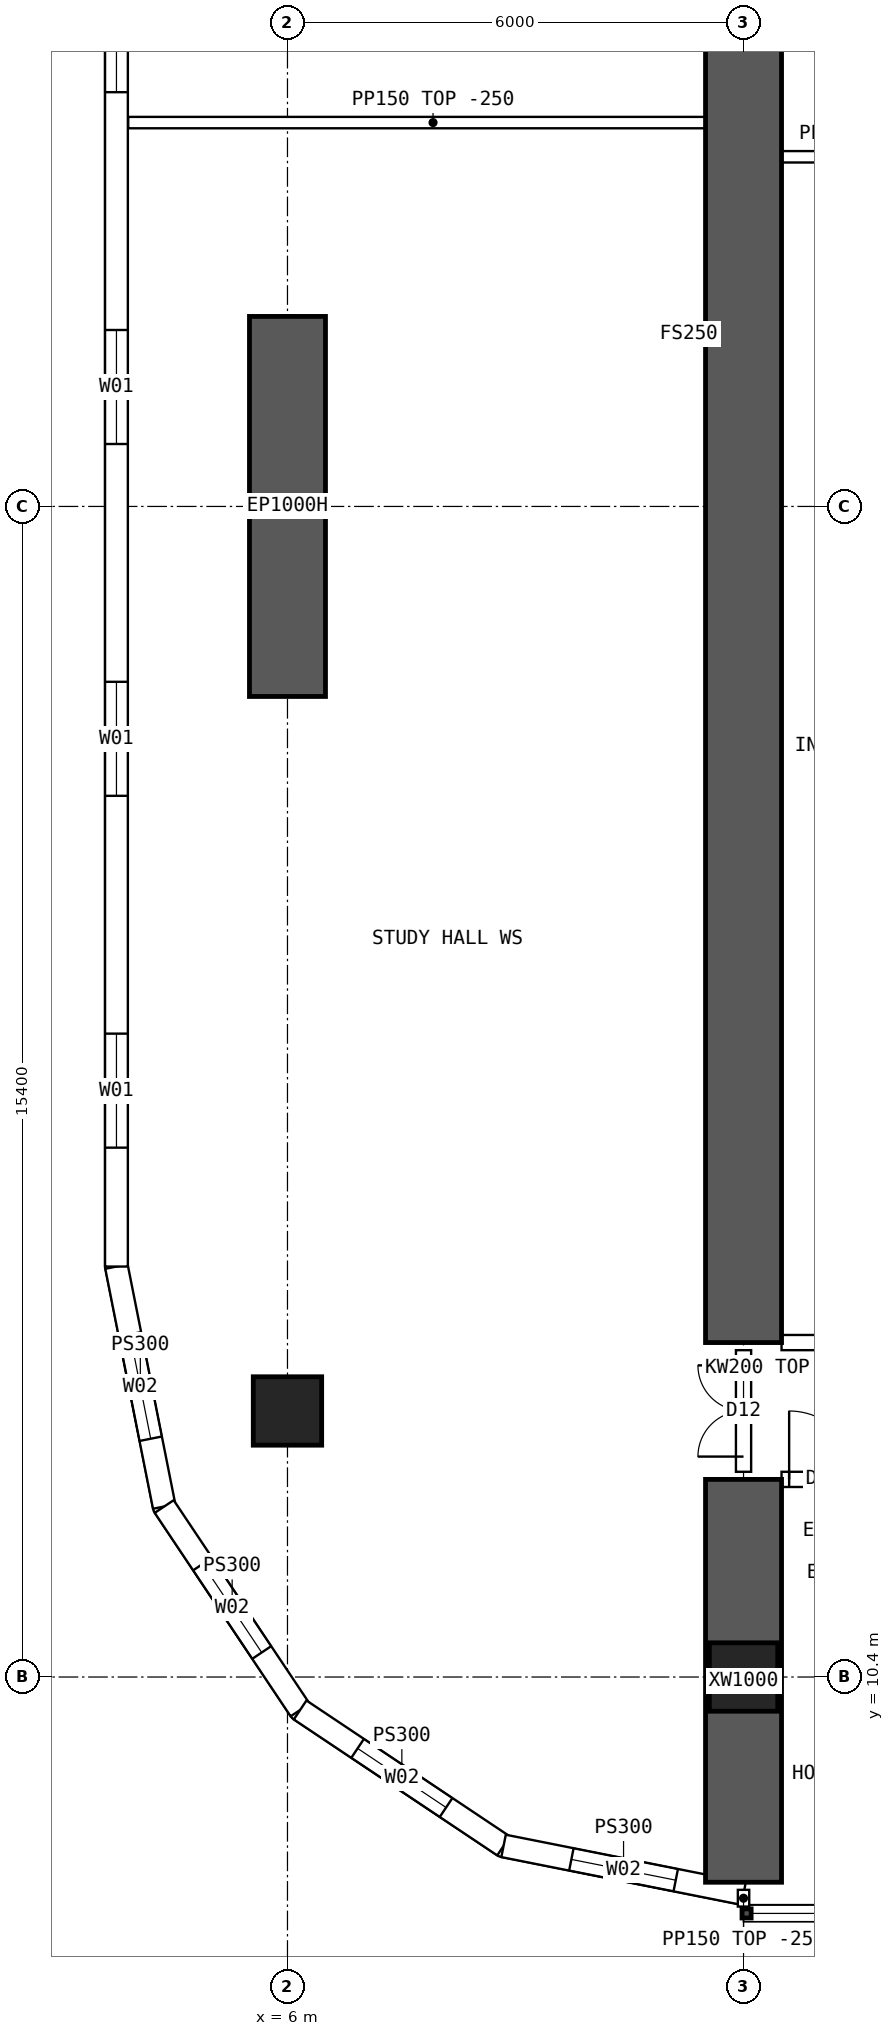
"""IFC4 building model, lengths in metres.
Left out: names, types, materials, properties, quantities, classifications, styles, units other than length and angle.
Written with IfcOpenShell. Run it as: python <this file> out.ifc"""

import sys

from ifc_helpers import new_model, si_unit, direction, frame, frame_2d, origin, origin_2d, place, context, subcontext, project, spatial, polyline, rectangle, hollow_rectangle, outline, extrude, element, fill, save


model = new_model("IFC4")
c1 = context("Model", 3, precision=1e-05, world=origin(), true_north=direction((0.0, 1.0)))
c2 = subcontext(c1, "Body", "Model", "MODEL_VIEW")
j1 = project(units=[si_unit("LENGTHUNIT", "METRE"), si_unit("PLANEANGLEUNIT", "RADIAN")], contexts=[c1])
p1 = place(None, origin())
s1 = spatial("IfcSite", under=j1, at=p1, CompositionType="ELEMENT")
p2 = place(p1, origin())
s2 = spatial("IfcBuilding", under=s1, at=p2, CompositionType="ELEMENT")
p3 = place(p2, frame((0.0, 0.0, 31.45)))
s3 = spatial("IfcBuildingStorey", under=s2, at=p3, CompositionType="ELEMENT", Elevation=31.45)
for number, where, z_axis, x_axis in (
    (1, (12.0, 10.4, 0.0), (0.0, 0.0, 1.0), (1.0, 0.0, 0.0)),
    (2, (6.0, 13.9, 0.0), (0.0, 0.0, 1.0), (1.0, 0.0, 0.0)),
):
    element("IfcColumn", number, at=place(p3, frame(where, z_axis=z_axis, x_axis=x_axis)), inside=s3, PredefinedType="COLUMN", context=c2, shape_type="SweptSolid", body=[
        extrude(hollow_rectangle(XDim=0.9, YDim=0.9, WallThickness=0.09, at=origin_2d()), origin(), (0.0, 0.0, 1.0), 3.75),
    ])
p4 = place(p3, frame((6.0, 23.3, 0.0), z_axis=(0.0, 0.0, 1.0), x_axis=(0.0, 1.0, 0.0)))
e3 = element("IfcWall", 3, at=p4, inside=s3, PredefinedType="SHEAR", context=c2, shape_type="SweptSolid", body=[
    extrude(rectangle(XDim=5.0, YDim=1.0, at=frame_2d((2.5, 0.0))), origin(), (0.0, 0.0, 1.0), 3.75),
])
p5 = place(p3, frame((12.0, 7.7, 0.0), z_axis=(0.0, 0.0, 1.0), x_axis=(0.0, 1.0, 0.0)))
e4 = element("IfcWall", 4, at=p5, inside=s3, PredefinedType="SHEAR", context=c2, shape_type="SweptSolid", body=[
    extrude(rectangle(XDim=5.3, YDim=1.0, at=frame_2d((2.65, 0.0))), origin(), (0.0, 0.0, 1.0), 3.75),
])
p6 = place(p3, frame((12.0, 14.8, 0.0), z_axis=(0.0, 0.0, 1.0), x_axis=(0.0, 1.0, 0.0)))
e5 = element("IfcWall", 5, at=p6, inside=s3, PredefinedType="SHEAR", context=c2, shape_type="SweptSolid", body=[
    extrude(rectangle(XDim=34.4, YDim=1.0, at=frame_2d((17.2, 0.0))), origin(), (0.0, 0.0, 1.0), 3.75),
])
p7 = place(p3, frame((3.75, 48.2, 0.0), z_axis=(0.0, 0.0, 1.0), x_axis=(0.0, -1.0, 0.0)))
e6 = element("IfcWall", 6, at=p7, inside=s3, PredefinedType="SOLIDWALL", context=c2, shape_type="SweptSolid", body=[
    extrude(outline(polyline([(-0.015, -0.15), (32.415, -0.15), (32.385, 0.15), (0.015, 0.15), (-0.015, -0.15)])), origin(), (0.0, 0.0, 1.0), 3.5),
])
p8 = place(p7, frame((1.564, 0.0, 0.9)))
e7 = element("IfcOpeningElement", 7, at=p8, cuts=e6, PredefinedType="OPENING", context=c2, shape_type="SweptSolid", body=[
    extrude(rectangle(XDim=1.5, YDim=2.0, at=frame_2d((0.75, 1.0))), frame((0.0, 0.16, 0.0), z_axis=(0.0, -1.0, 0.0), x_axis=(1.0, 0.0, 0.0)), (0.0, 0.0, 1.0), 0.32),
])
p9 = place(p7, frame((6.193, 0.0, 0.9)))
e8 = element("IfcOpeningElement", 8, at=p9, cuts=e6, PredefinedType="OPENING", context=c2, shape_type="SweptSolid", body=[
    extrude(rectangle(XDim=1.5, YDim=2.0, at=frame_2d((0.75, 1.0))), frame((0.0, 0.16, 0.0), z_axis=(0.0, -1.0, 0.0), x_axis=(1.0, 0.0, 0.0)), (0.0, 0.0, 1.0), 0.32),
])
p10 = place(p7, frame((10.822, 0.0, 0.9)))
e9 = element("IfcOpeningElement", 9, at=p10, cuts=e6, PredefinedType="OPENING", context=c2, shape_type="SweptSolid", body=[
    extrude(rectangle(XDim=1.5, YDim=2.0, at=frame_2d((0.75, 1.0))), frame((0.0, 0.16, 0.0), z_axis=(0.0, -1.0, 0.0), x_axis=(1.0, 0.0, 0.0)), (0.0, 0.0, 1.0), 0.32),
])
p11 = place(p7, frame((15.45, 0.0, 0.9)))
e10 = element("IfcOpeningElement", 10, at=p11, cuts=e6, PredefinedType="OPENING", context=c2, shape_type="SweptSolid", body=[
    extrude(rectangle(XDim=1.5, YDim=2.0, at=frame_2d((0.75, 1.0))), frame((0.0, 0.16, 0.0), z_axis=(0.0, -1.0, 0.0), x_axis=(1.0, 0.0, 0.0)), (0.0, 0.0, 1.0), 0.32),
])
p12 = place(p7, frame((20.079, 0.0, 0.9)))
e11 = element("IfcOpeningElement", 11, at=p12, cuts=e6, PredefinedType="OPENING", context=c2, shape_type="SweptSolid", body=[
    extrude(rectangle(XDim=1.5, YDim=2.0, at=frame_2d((0.75, 1.0))), frame((0.0, 0.16, 0.0), z_axis=(0.0, -1.0, 0.0), x_axis=(1.0, 0.0, 0.0)), (0.0, 0.0, 1.0), 0.32),
])
p13 = place(p7, frame((24.707, 0.0, 0.9)))
e12 = element("IfcOpeningElement", 12, at=p13, cuts=e6, PredefinedType="OPENING", context=c2, shape_type="SweptSolid", body=[
    extrude(rectangle(XDim=1.5, YDim=2.0, at=frame_2d((0.75, 1.0))), frame((0.0, 0.16, 0.0), z_axis=(0.0, -1.0, 0.0), x_axis=(1.0, 0.0, 0.0)), (0.0, 0.0, 1.0), 0.32),
])
p14 = place(p7, frame((29.336, 0.0, 0.9)))
e13 = element("IfcOpeningElement", 13, at=p14, cuts=e6, PredefinedType="OPENING", context=c2, shape_type="SweptSolid", body=[
    extrude(rectangle(XDim=1.5, YDim=2.0, at=frame_2d((0.75, 1.0))), frame((0.0, 0.16, 0.0), z_axis=(0.0, -1.0, 0.0), x_axis=(1.0, 0.0, 0.0)), (0.0, 0.0, 1.0), 0.32),
])
p15 = place(p3, frame((3.75, 15.8, 0.0), z_axis=(0.0, 0.0, 1.0), x_axis=(0.195065901187, -0.980790137692, 0.0)))
e14 = element("IfcWall", 14, at=p15, inside=s3, PredefinedType="SOLIDWALL", context=c2, shape_type="SweptSolid", body=[
    extrude(outline(polyline([(-0.015, -0.15), (3.249, -0.15), (3.189, 0.15), (0.015, 0.15), (-0.015, -0.15)])), origin(), (0.0, 0.0, 1.0), 3.5),
])
p16 = place(p15, frame((0.909, 0.0, 0.9)))
e15 = element("IfcOpeningElement", 15, at=p16, cuts=e14, PredefinedType="OPENING", context=c2, shape_type="SweptSolid", body=[
    extrude(rectangle(XDim=1.4, YDim=1.8, at=frame_2d((0.7, 0.9))), frame((0.0, 0.16, 0.0), z_axis=(0.0, -1.0, 0.0), x_axis=(1.0, 0.0, 0.0)), (0.0, 0.0, 1.0), 0.32),
])
p17 = place(p3, frame((4.378, 12.643, 0.0), z_axis=(0.0, 0.0, 1.0), x_axis=(0.555609954424, -0.831443069936, 0.0)))
e16 = element("IfcWall", 16, at=p17, inside=s3, PredefinedType="SOLIDWALL", context=c2, shape_type="SweptSolid", body=[
    extrude(outline(polyline([(-0.03, -0.15), (3.249, -0.15), (3.189, 0.15), (0.03, 0.15), (-0.03, -0.15)])), origin(), (0.0, 0.0, 1.0), 3.5),
])
p18 = place(p17, frame((0.909, 0.0, 0.9)))
e17 = element("IfcOpeningElement", 17, at=p18, cuts=e16, PredefinedType="OPENING", context=c2, shape_type="SweptSolid", body=[
    extrude(rectangle(XDim=1.4, YDim=1.8, at=frame_2d((0.7, 0.9))), frame((0.0, 0.16, 0.0), z_axis=(0.0, -1.0, 0.0), x_axis=(1.0, 0.0, 0.0)), (0.0, 0.0, 1.0), 0.32),
])
p19 = place(p3, frame((6.167, 9.966, 0.0), z_axis=(0.0, 0.0, 1.0), x_axis=(0.831478105043, -0.555557522525, 0.0)))
e18 = element("IfcWall", 18, at=p19, inside=s3, PredefinedType="SOLIDWALL", context=c2, shape_type="SweptSolid", body=[
    extrude(outline(polyline([(-0.03, -0.15), (3.249, -0.15), (3.189, 0.15), (0.03, 0.15), (-0.03, -0.15)])), origin(), (0.0, 0.0, 1.0), 3.5),
])
p20 = place(p19, frame((0.909, 0.0, 0.9)))
e19 = element("IfcOpeningElement", 19, at=p20, cuts=e18, PredefinedType="OPENING", context=c2, shape_type="SweptSolid", body=[
    extrude(rectangle(XDim=1.4, YDim=1.8, at=frame_2d((0.7, 0.9))), frame((0.0, 0.16, 0.0), z_axis=(0.0, -1.0, 0.0), x_axis=(1.0, 0.0, 0.0)), (0.0, 0.0, 1.0), 0.32),
])
p21 = place(p3, frame((8.843, 8.178, 0.0), z_axis=(0.0, 0.0, 1.0), x_axis=(0.980787251524, -0.195080412259, 0.0)))
e20 = element("IfcWall", 20, at=p21, inside=s3, PredefinedType="SOLIDWALL", context=c2, shape_type="SweptSolid", body=[
    extrude(outline(polyline([(-0.03, -0.15), (3.249, -0.15), (3.189, 0.15), (0.03, 0.15), (-0.03, -0.15)])), origin(), (0.0, 0.0, 1.0), 3.5),
])
p22 = place(p21, frame((0.909, 0.0, 0.9)))
e21 = element("IfcOpeningElement", 21, at=p22, cuts=e20, PredefinedType="OPENING", context=c2, shape_type="SweptSolid", body=[
    extrude(rectangle(XDim=1.4, YDim=1.8, at=frame_2d((0.7, 0.9))), frame((0.0, 0.16, 0.0), z_axis=(0.0, -1.0, 0.0), x_axis=(1.0, 0.0, 0.0)), (0.0, 0.0, 1.0), 0.32),
])
p23 = place(p3, frame((12.5, 13.0, 0.0), z_axis=(0.0, 0.0, 1.0), x_axis=(1.0, 0.0, 0.0)))
e22 = element("IfcWall", 22, at=p23, inside=s3, PredefinedType="SOLIDWALL", context=c2, shape_type="SweptSolid", body=[
    extrude(outline(polyline([(0.0, 0.0), (5.0, 0.0), (5.0, 3.1), (0.0, 3.1), (0.0, 0.0)])), frame((0.0, 0.1, 0.0), z_axis=(0.0, -1.0, 0.0), x_axis=(1.0, 0.0, 0.0)), (0.0, 0.0, 1.0), 0.2),
])
p24 = place(p23, frame((0.1, 0.0, 0.0)))
e23 = element("IfcOpeningElement", 23, at=p24, cuts=e22, PredefinedType="OPENING", context=c2, shape_type="SweptSolid", body=[
    extrude(rectangle(XDim=0.9, YDim=2.1, at=frame_2d((0.45, 1.05))), frame((0.0, 0.11, 0.0), z_axis=(0.0, -1.0, 0.0), x_axis=(1.0, 0.0, 0.0)), (0.0, 0.0, 1.0), 0.22),
])
p25 = place(p23, frame((4.0, 0.0, 0.0)))
e24 = element("IfcOpeningElement", 24, at=p25, cuts=e22, PredefinedType="OPENING", context=c2, shape_type="SweptSolid", body=[
    extrude(rectangle(XDim=0.9, YDim=2.1, at=frame_2d((0.45, 1.05))), frame((0.0, 0.11, 0.0), z_axis=(0.0, -1.0, 0.0), x_axis=(1.0, 0.0, 0.0)), (0.0, 0.0, 1.0), 0.22),
])
p26 = place(p3, frame((12.5, 14.8, 0.0), z_axis=(0.0, 0.0, 1.0), x_axis=(1.0, 0.0, 0.0)))
e25 = element("IfcWall", 25, at=p26, inside=s3, PredefinedType="SOLIDWALL", context=c2, shape_type="SweptSolid", body=[
    extrude(rectangle(XDim=5.0, YDim=0.2, at=frame_2d((2.5, 0.0))), origin(), (0.0, 0.0, 1.0), 3.5),
])
p27 = place(p26, frame((3.3, 0.0, 0.0)))
e26 = element("IfcOpeningElement", 26, at=p27, cuts=e25, PredefinedType="OPENING", context=c2, shape_type="SweptSolid", body=[
    extrude(rectangle(XDim=1.6, YDim=2.1, at=frame_2d((0.8, 1.05))), frame((0.0, 0.11, 0.0), z_axis=(0.0, -1.0, 0.0), x_axis=(1.0, 0.0, 0.0)), (0.0, 0.0, 1.0), 0.22),
])
p28 = place(p3, frame((12.0, 30.4, 0.0), z_axis=(0.0, 0.0, 1.0), x_axis=(1.0, 0.0, 0.0)))
e27 = element("IfcWall", 27, at=p28, inside=s3, PredefinedType="PARTITIONING", context=c2, shape_type="SweptSolid", body=[
    extrude(rectangle(XDim=3.6, YDim=0.15, at=frame_2d((1.8, 0.0))), origin(), (0.0, 0.0, 1.0), 3.5),
])
p29 = place(p3, frame((3.905, 30.85, 0.0), z_axis=(0.0, 0.0, 1.0), x_axis=(1.0, 0.0, 0.0)))
e28 = element("IfcWall", 28, at=p29, inside=s3, PredefinedType="PARTITIONING", context=c2, shape_type="SweptSolid", body=[
    extrude(outline(polyline([(0.0, 0.0), (8.02, 0.0), (8.02, 3.5), (2.397, 3.5), (2.395, 3.05), (1.797, 3.05), (1.795, 3.5), (0.0, 3.5), (0.0, 0.0)])), frame((0.0, 0.075, 0.0), z_axis=(0.0, -1.0, 0.0), x_axis=(1.0, 0.0, 0.0)), (0.0, 0.0, 1.0), 0.15),
])
p30 = place(p3, frame((12.0, 13.1, 0.0), z_axis=(0.0, 0.0, 1.0), x_axis=(0.0, 1.0, 0.0)))
e29 = element("IfcWall", 29, at=p30, inside=s3, PredefinedType="SOLIDWALL", context=c2, shape_type="SweptSolid", body=[
    extrude(outline(polyline([(0.0, 0.0), (1.6, 0.0), (1.6, 3.05), (0.0, 3.05), (0.0, 0.0)])), frame((0.0, 0.1, 0.0), z_axis=(0.0, -1.0, 0.0), x_axis=(1.0, 0.0, 0.0)), (0.0, 0.0, 1.0), 0.2),
])
p31 = place(p30, frame((0.2, 0.0, 0.0)))
e30 = element("IfcOpeningElement", 30, at=p31, cuts=e29, PredefinedType="OPENING", context=c2, shape_type="SweptSolid", body=[
    extrude(rectangle(XDim=1.2, YDim=2.1, at=frame_2d((0.6, 1.05))), frame((0.0, 0.11, 0.0), z_axis=(0.0, -1.0, 0.0), x_axis=(1.0, 0.0, 0.0)), (0.0, 0.0, 1.0), 0.22),
])
p32 = place(p3, frame((12.0, 7.6, 0.0), z_axis=(0.0, 0.0, 1.0), x_axis=(0.0, -1.0, 0.0)))
e31 = element("IfcWall", 31, at=p32, inside=s3, PredefinedType="PARTITIONING", context=c2, shape_type="SweptSolid", body=[
    extrude(rectangle(XDim=0.22, YDim=0.15, at=frame_2d((0.11, 0.0))), origin(), (0.0, 0.0, 1.0), 3.5),
])
p33 = place(p11, origin())
e32 = element("IfcWindow", 32, at=p33, inside=s3, PartitioningType="SINGLE_PANEL", PredefinedType="WINDOW", context=c2, shape_type="SweptSolid", body=[
    extrude(rectangle(XDim=1.5, YDim=2.0, at=frame_2d((0.75, 1.0))), frame((0.0, 0.03, 0.0), z_axis=(0.0, -1.0, 0.0), x_axis=(1.0, 0.0, 0.0)), (0.0, 0.0, 1.0), 0.06),
])
fill(e10, e32)
p34 = place(p12, origin())
e33 = element("IfcWindow", 33, at=p34, inside=s3, PartitioningType="SINGLE_PANEL", PredefinedType="WINDOW", context=c2, shape_type="SweptSolid", body=[
    extrude(rectangle(XDim=1.5, YDim=2.0, at=frame_2d((0.75, 1.0))), frame((0.0, 0.03, 0.0), z_axis=(0.0, -1.0, 0.0), x_axis=(1.0, 0.0, 0.0)), (0.0, 0.0, 1.0), 0.06),
])
fill(e11, e33)
p35 = place(p13, origin())
e34 = element("IfcWindow", 34, at=p35, inside=s3, PartitioningType="SINGLE_PANEL", PredefinedType="WINDOW", context=c2, shape_type="SweptSolid", body=[
    extrude(rectangle(XDim=1.5, YDim=2.0, at=frame_2d((0.75, 1.0))), frame((0.0, 0.03, 0.0), z_axis=(0.0, -1.0, 0.0), x_axis=(1.0, 0.0, 0.0)), (0.0, 0.0, 1.0), 0.06),
])
fill(e12, e34)
p36 = place(p14, origin())
e35 = element("IfcWindow", 35, at=p36, inside=s3, PartitioningType="SINGLE_PANEL", PredefinedType="WINDOW", context=c2, shape_type="SweptSolid", body=[
    extrude(rectangle(XDim=1.5, YDim=2.0, at=frame_2d((0.75, 1.0))), frame((0.0, 0.03, 0.0), z_axis=(0.0, -1.0, 0.0), x_axis=(1.0, 0.0, 0.0)), (0.0, 0.0, 1.0), 0.06),
])
fill(e13, e35)
p37 = place(p16, origin())
e36 = element("IfcWindow", 36, at=p37, inside=s3, PartitioningType="SINGLE_PANEL", PredefinedType="WINDOW", context=c2, shape_type="SweptSolid", body=[
    extrude(rectangle(XDim=1.4, YDim=1.8, at=frame_2d((0.7, 0.9))), frame((0.0, 0.03, 0.0), z_axis=(0.0, -1.0, 0.0), x_axis=(1.0, 0.0, 0.0)), (0.0, 0.0, 1.0), 0.06),
])
fill(e15, e36)
p38 = place(p18, origin())
e37 = element("IfcWindow", 37, at=p38, inside=s3, PartitioningType="SINGLE_PANEL", PredefinedType="WINDOW", context=c2, shape_type="SweptSolid", body=[
    extrude(rectangle(XDim=1.4, YDim=1.8, at=frame_2d((0.7, 0.9))), frame((0.0, 0.03, 0.0), z_axis=(0.0, -1.0, 0.0), x_axis=(1.0, 0.0, 0.0)), (0.0, 0.0, 1.0), 0.06),
])
fill(e17, e37)
p39 = place(p20, origin())
e38 = element("IfcWindow", 38, at=p39, inside=s3, PartitioningType="SINGLE_PANEL", PredefinedType="WINDOW", context=c2, shape_type="SweptSolid", body=[
    extrude(rectangle(XDim=1.4, YDim=1.8, at=frame_2d((0.7, 0.9))), frame((0.0, 0.03, 0.0), z_axis=(0.0, -1.0, 0.0), x_axis=(1.0, 0.0, 0.0)), (0.0, 0.0, 1.0), 0.06),
])
fill(e19, e38)
p40 = place(p22, origin())
e39 = element("IfcWindow", 39, at=p40, inside=s3, PartitioningType="SINGLE_PANEL", PredefinedType="WINDOW", context=c2, shape_type="SweptSolid", body=[
    extrude(rectangle(XDim=1.4, YDim=1.8, at=frame_2d((0.7, 0.9))), frame((0.0, 0.03, 0.0), z_axis=(0.0, -1.0, 0.0), x_axis=(1.0, 0.0, 0.0)), (0.0, 0.0, 1.0), 0.06),
])
fill(e21, e39)
p41 = place(p24, origin())
e40 = element("IfcDoor", 40, at=p41, inside=s3, OperationType="SINGLE_SWING_LEFT", PredefinedType="DOOR", context=c2, shape_type="SweptSolid", body=[
    extrude(rectangle(XDim=0.9, YDim=2.1, at=frame_2d((0.45, 1.05))), frame((0.0, 0.025, 0.0), z_axis=(0.0, -1.0, 0.0), x_axis=(1.0, 0.0, 0.0)), (0.0, 0.0, 1.0), 0.05),
])
fill(e23, e40)
p42 = place(p31, origin())
e41 = element("IfcDoor", 41, at=p42, inside=s3, OperationType="DOUBLE_DOOR_SINGLE_SWING", PredefinedType="DOOR", context=c2, shape_type="SweptSolid", body=[
    extrude(rectangle(XDim=1.2, YDim=2.1, at=frame_2d((0.6, 1.05))), frame((0.0, 0.025, 0.0), z_axis=(0.0, -1.0, 0.0), x_axis=(1.0, 0.0, 0.0)), (0.0, 0.0, 1.0), 0.05),
])
fill(e30, e41)
save(model, sys.argv[1])
